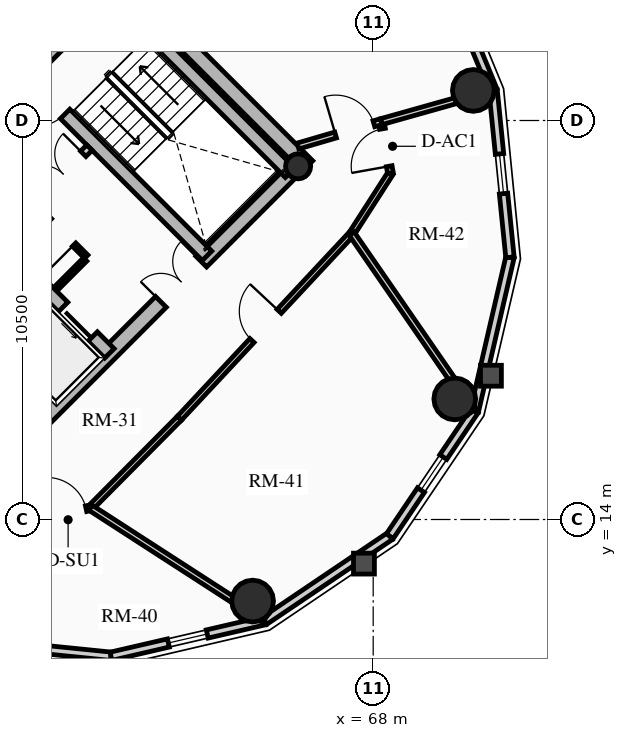
"""IFC4 building model, lengths in metres.
Left out: names, types, materials, properties, quantities, classifications, styles, units other than length and angle.
Written with IfcOpenShell. Run it as: python <this file> out.ifc"""

import sys

from ifc_helpers import new_model, si_unit, direction, frame, frame_2d, origin, origin_2d, place, context, subcontext, project, spatial, rectangle, circle, hollow_circle, extrude, source, transform, mapped, element, fill, save


model = new_model("IFC4")
c1 = context("Model", 3, precision=1e-05, world=origin(), true_north=direction((0.0, 1.0)))
c2 = subcontext(c1, "Body", "Model", "MODEL_VIEW")
j1 = project(units=[si_unit("LENGTHUNIT", "METRE"), si_unit("PLANEANGLEUNIT", "RADIAN")], contexts=[c1])
p1 = place(None, origin())
s1 = spatial("IfcSite", under=j1, at=p1, CompositionType="ELEMENT")
p2 = place(p1, origin())
s2 = spatial("IfcBuilding", under=s1, at=p2, CompositionType="ELEMENT")
p3 = place(p2, frame((0.0, 0.0, 211.21)))
s3 = spatial("IfcBuildingStorey", under=s2, at=p3, CompositionType="ELEMENT", Elevation=211.21)
p4 = place(p3, frame((66.268, 23.298, 0.0), z_axis=(0.0, 0.0, 1.0), x_axis=(-0.707106781187, 0.707106781187, 0.0)))
e1 = element("IfcWall", 1, at=p4, inside=s3, PredefinedType="SHEAR", context=c2, shape_type="SweptSolid", body=[
    extrude(rectangle(XDim=14.1, YDim=0.4, at=frame_2d((7.05, 0.0))), origin(), (0.0, 0.0, 1.0), 2.91),
])
p5 = place(p3, frame((58.561, 15.873, 0.0), z_axis=(0.0, 0.0, 1.0), x_axis=(0.707106781187, 0.707106781187, 0.0)))
e2 = element("IfcWall", 2, at=p5, inside=s3, PredefinedType="SHEAR", context=c2, shape_type="SweptSolid", body=[
    extrude(rectangle(XDim=10.7, YDim=0.4, at=frame_2d((5.35, 0.0))), origin(), (0.0, 0.0, 1.0), 2.91),
])
m1 = source(origin(), c2, "Body", "SweptSolid", [
    extrude(rectangle(XDim=1.5, YDim=2.02, at=frame_2d((0.75, 1.01))), frame((0.0, 0.21, 0.0), z_axis=(0.0, -1.0, 0.0), x_axis=(1.0, 0.0, 0.0)), (0.0, 0.0, 1.0), 0.42),
])
p6 = place(p5, frame((5.45, 0.0, 0.0)))
e3 = element("IfcOpeningElement", 3, at=p6, cuts=e2, PredefinedType="OPENING", context=c2, shape_type="MappedRepresentation", body=[
    mapped(m1, transform((0.0, 0.0, 0.0), x_axis=(1.0, 0.0, 0.0), y_axis=(0.0, 1.0, 0.0), z_axis=(0.0, 0.0, 1.0), scale=1.0)),
])
p7 = place(p3, frame((61.06, 18.373, 0.0), z_axis=(0.0, 0.0, 1.0), x_axis=(-0.707106781187, 0.707106781187, 0.0)))
e4 = element("IfcWall", 4, at=p7, inside=s3, PredefinedType="SHEAR", context=c2, shape_type="SweptSolid", body=[
    extrude(rectangle(XDim=13.7, YDim=0.35, at=frame_2d((6.85, 0.0))), origin(), (0.0, 0.0, 1.0), 2.91),
])
m2 = source(origin(), c2, "Body", "SweptSolid", [
    extrude(rectangle(XDim=1.1, YDim=2.015, at=frame_2d((0.55, 1.007))), frame((0.0, 0.185, 0.0), z_axis=(0.0, -1.0, 0.0), x_axis=(1.0, 0.0, 0.0)), (0.0, 0.0, 1.0), 0.37),
])
p8 = place(p7, frame((4.85, 0.0, 0.0)))
e5 = element("IfcOpeningElement", 5, at=p8, cuts=e4, PredefinedType="OPENING", context=c2, shape_type="MappedRepresentation", body=[
    mapped(m2, transform((0.0, 0.0, 0.0), x_axis=(1.0, 0.0, 0.0), y_axis=(0.0, 1.0, 0.0), z_axis=(0.0, 0.0, 1.0), scale=1.0)),
])
p9 = place(p7, frame((0.625, 0.0, 0.0)))
e6 = element("IfcOpeningElement", 6, at=p9, cuts=e4, PredefinedType="OPENING", context=c2, shape_type="MappedRepresentation", body=[
    mapped(m2, transform((0.0, 0.0, 0.0), x_axis=(1.0, 0.0, 0.0), y_axis=(0.0, 1.0, 0.0), z_axis=(0.0, 0.0, 1.0), scale=1.0)),
])
p10 = place(p7, frame((2.625, 0.0, 0.0)))
e7 = element("IfcOpeningElement", 7, at=p10, cuts=e4, PredefinedType="OPENING", context=c2, shape_type="MappedRepresentation", body=[
    mapped(m2, transform((0.0, 0.0, 0.0), x_axis=(1.0, 0.0, 0.0), y_axis=(0.0, 1.0, 0.0), z_axis=(0.0, 0.0, 1.0), scale=1.0)),
])
m3 = source(origin(), c2, "Body", "SweptSolid", [
    extrude(rectangle(XDim=1.15, YDim=2.02, at=frame_2d((0.575, 1.01))), frame((0.0, 0.185, 0.0), z_axis=(0.0, -1.0, 0.0), x_axis=(1.0, 0.0, 0.0)), (0.0, 0.0, 1.0), 0.37),
])
p11 = place(p7, frame((7.27, 0.0, 0.0)))
e8 = element("IfcOpeningElement", 8, at=p11, cuts=e4, PredefinedType="OPENING", context=c2, shape_type="MappedRepresentation", body=[
    mapped(m3, transform((0.0, 0.0, 0.0), x_axis=(1.0, 0.0, 0.0), y_axis=(0.0, 1.0, 0.0), z_axis=(0.0, 0.0, 1.0), scale=1.0)),
])
p12 = place(p3, frame((63.627, 20.94, 0.0), z_axis=(0.0, 0.0, 1.0), x_axis=(-0.707119496762, 0.707094065383, 0.0)))
e9 = element("IfcWall", 9, at=p12, inside=s3, PredefinedType="SHEAR", context=c2, shape_type="SweptSolid", body=[
    extrude(rectangle(XDim=9.6, YDim=0.35, at=frame_2d((4.8, 0.0))), origin(), (0.0, 0.0, 1.0), 2.91),
])
p13 = place(p12, frame((5.28, 0.0, 0.0)))
e10 = element("IfcOpeningElement", 10, at=p13, cuts=e9, PredefinedType="OPENING", context=c2, shape_type="MappedRepresentation", body=[
    mapped(m3, transform((0.0, 0.0, 0.0), x_axis=(1.0, 0.0, 0.0), y_axis=(0.0, 1.0, 0.0), z_axis=(0.0, 0.0, 1.0), scale=1.0)),
])
p14 = place(p3, frame((65.812, 23.125, 0.0), z_axis=(0.0, 0.0, 1.0), x_axis=(-0.707106781187, 0.707106781187, 0.0)))
e11 = element("IfcWall", 11, at=p14, inside=s3, PredefinedType="SHEAR", context=c2, shape_type="SweptSolid", body=[
    extrude(rectangle(XDim=6.695, YDim=0.35, at=frame_2d((3.348, 0.0))), origin(), (0.0, 0.0, 1.0), 2.91),
])
p15 = place(p3, frame((58.893, 25.674, 0.0), z_axis=(0.0, 0.0, 1.0), x_axis=(0.707106781187, 0.707106781187, 0.0)))
e12 = element("IfcWall", 12, at=p15, inside=s3, PredefinedType="SHEAR", context=c2, shape_type="SweptSolid", body=[
    extrude(rectangle(XDim=3.285, YDim=0.35, at=frame_2d((1.643, 0.0))), origin(), (0.0, 0.0, 1.0), 2.91),
])
p16 = place(p3, frame((66.024, 23.294, 0.0), z_axis=(0.0, 0.0, 1.0), x_axis=(0.707106781187, 0.707106781187, 0.0)))
e13 = element("IfcColumn", 13, at=p16, inside=s3, PredefinedType="COLUMN", context=c2, shape_type="SweptSolid", body=[
    extrude(hollow_circle(Radius=0.33, WallThickness=0.025, at=origin_2d()), origin(), (0.0, 0.0, 1.0), 2.91),
])
for number, where, z_axis, x_axis in (
    (14, (64.827, 11.854, 0.0), (0.0, 0.0, 1.0), (1.0, 0.0, 0.0)),
    (15, (70.146, 17.173, 0.0), (0.0, 0.0, 1.0), (1.0, 0.0, 0.0)),
    (16, (70.635, 25.291, 0.0), (0.0, 0.0, 1.0), (1.0, 0.0, 0.0)),
):
    element("IfcColumn", number, at=place(p3, frame(where, z_axis=z_axis, x_axis=x_axis)), inside=s3, PredefinedType="USERDEFINED", context=c2, shape_type="SweptSolid", body=[
        extrude(circle(Radius=0.55, at=origin_2d()), origin(), (0.0, 0.0, 1.0), 2.91),
    ])
p17 = place(p3, frame((61.1, 10.401, 0.0), z_axis=(0.0, 0.0, 1.0), x_axis=(-0.994929930991, 0.100570534541, 0.0)))
e17 = element("IfcWall", 17, at=p17, inside=s3, PredefinedType="SOLIDWALL", context=c2, shape_type="SweptSolid", body=[
    extrude(rectangle(XDim=4.418, YDim=0.22, at=frame_2d((2.209, 0.0))), origin(), (0.0, 0.0, 1.0), 2.322),
])
m4 = source(origin(), c2, "Body", "SweptSolid", [
    extrude(rectangle(XDim=1.05, YDim=1.3, at=frame_2d((0.525, 0.65))), frame((0.0, 0.12, 0.0), z_axis=(0.0, -1.0, 0.0), x_axis=(1.0, 0.0, 0.0)), (0.0, 0.0, 1.0), 0.24),
])
p18 = place(p17, frame((1.684, 0.0, 0.65)))
e18 = element("IfcOpeningElement", 18, at=p18, cuts=e17, PredefinedType="OPENING", context=c2, shape_type="MappedRepresentation", body=[
    mapped(m4, transform((0.0, 0.0, 0.0), x_axis=(1.0, 0.0, 0.0), y_axis=(0.0, 1.0, 0.0), z_axis=(0.0, 0.0, 1.0), scale=1.0)),
])
p19 = place(p3, frame((65.144, 11.337, 0.0), z_axis=(0.0, 0.0, 1.0), x_axis=(-0.974249228678, -0.225473813158, 0.0)))
e19 = element("IfcWall", 19, at=p19, inside=s3, PredefinedType="SOLIDWALL", context=c2, shape_type="SweptSolid", body=[
    extrude(rectangle(XDim=4.15, YDim=0.22, at=frame_2d((2.075, 0.0))), origin(), (0.0, 0.0, 1.0), 2.322),
])
p20 = place(p19, frame((1.55, 0.0, 0.65)))
e20 = element("IfcOpeningElement", 20, at=p20, cuts=e19, PredefinedType="OPENING", context=c2, shape_type="MappedRepresentation", body=[
    mapped(m4, transform((0.0, 0.0, 0.0), x_axis=(1.0, 0.0, 0.0), y_axis=(0.0, 1.0, 0.0), z_axis=(0.0, 0.0, 1.0), scale=1.0)),
])
p21 = place(p3, frame((68.439, 13.561, 0.0), z_axis=(0.0, 0.0, 1.0), x_axis=(-0.828833723692, -0.559495003079, 0.0)))
e21 = element("IfcWall", 21, at=p21, inside=s3, PredefinedType="SOLIDWALL", context=c2, shape_type="SweptSolid", body=[
    extrude(rectangle(XDim=3.976, YDim=0.22, at=frame_2d((1.988, 0.0))), origin(), (0.0, 0.0, 1.0), 2.322),
])
p22 = place(p3, frame((70.663, 16.856, 0.0), z_axis=(0.0, 0.0, 1.0), x_axis=(-0.559495003079, -0.828833723692, 0.0)))
e22 = element("IfcWall", 22, at=p22, inside=s3, PredefinedType="SOLIDWALL", context=c2, shape_type="SweptSolid", body=[
    extrude(rectangle(XDim=3.976, YDim=0.22, at=frame_2d((1.988, 0.0))), origin(), (0.0, 0.0, 1.0), 2.322),
])
p23 = place(p22, frame((1.463, 0.0, 0.65)))
e23 = element("IfcOpeningElement", 23, at=p23, cuts=e22, PredefinedType="OPENING", context=c2, shape_type="MappedRepresentation", body=[
    mapped(m4, transform((0.0, 0.0, 0.0), x_axis=(1.0, 0.0, 0.0), y_axis=(0.0, 1.0, 0.0), z_axis=(0.0, 0.0, 1.0), scale=1.0)),
])
p24 = place(p3, frame((71.599, 20.9, 0.0), z_axis=(0.0, 0.0, 1.0), x_axis=(-0.225473813158, -0.974249228678, 0.0)))
e24 = element("IfcWall", 24, at=p24, inside=s3, PredefinedType="SOLIDWALL", context=c2, shape_type="SweptSolid", body=[
    extrude(rectangle(XDim=4.15, YDim=0.22, at=frame_2d((2.075, 0.0))), origin(), (0.0, 0.0, 1.0), 2.322),
])
p25 = place(p3, frame((71.155, 25.295, 0.0), z_axis=(0.0, 0.0, 1.0), x_axis=(0.100570534541, -0.994929930991, 0.0)))
e25 = element("IfcWall", 25, at=p25, inside=s3, PredefinedType="SOLIDWALL", context=c2, shape_type="SweptSolid", body=[
    extrude(rectangle(XDim=4.418, YDim=0.22, at=frame_2d((2.209, 0.0))), origin(), (0.0, 0.0, 1.0), 2.322),
])
p26 = place(p25, frame((1.684, 0.0, 0.65)))
e26 = element("IfcOpeningElement", 26, at=p26, cuts=e25, PredefinedType="OPENING", context=c2, shape_type="MappedRepresentation", body=[
    mapped(m4, transform((0.0, 0.0, 0.0), x_axis=(1.0, 0.0, 0.0), y_axis=(0.0, 1.0, 0.0), z_axis=(0.0, 0.0, 1.0), scale=1.0)),
])
p27 = place(p3, frame((69.374, 29.613, 0.0), z_axis=(0.0, 0.0, 1.0), x_axis=(0.381309704956, -0.924447353237, 0.0)))
e27 = element("IfcWall", 27, at=p27, inside=s3, PredefinedType="SOLIDWALL", context=c2, shape_type="SweptSolid", body=[
    extrude(rectangle(XDim=4.671, YDim=0.22, at=frame_2d((2.335, 0.0))), origin(), (0.0, 0.0, 1.0), 2.322),
])
p28 = place(p3, frame((58.214, 21.467, 0.0), z_axis=(0.0, 0.0, 1.0), x_axis=(0.707106781187, 0.707106781187, 0.0)))
e28 = element("IfcWall", 28, at=p28, inside=s3, PredefinedType="PARTITIONING", context=c2, shape_type="SweptSolid", body=[
    extrude(rectangle(XDim=3.28, YDim=0.2, at=frame_2d((1.64, 0.0))), origin(), (0.0, 0.0, 1.0), 2.685),
])
m5 = source(origin(), c2, "Body", "SweptSolid", [
    extrude(rectangle(XDim=1.5, YDim=2.02, at=frame_2d((0.75, 1.01))), frame((0.0, 0.11, 0.0), z_axis=(0.0, -1.0, 0.0), x_axis=(1.0, 0.0, 0.0)), (0.0, 0.0, 1.0), 0.22),
])
p29 = place(p28, frame((1.55, 0.0, 0.0)))
e29 = element("IfcOpeningElement", 29, at=p29, cuts=e28, PredefinedType="OPENING", context=c2, shape_type="MappedRepresentation", body=[
    mapped(m5, transform((0.0, 0.0, 0.0), x_axis=(1.0, 0.0, 0.0), y_axis=(0.0, 1.0, 0.0), z_axis=(0.0, 0.0, 1.0), scale=1.0)),
])
p30 = place(p3, frame((60.448, 20.915, 0.0), z_axis=(0.0, 0.0, 1.0), x_axis=(-0.707106781187, 0.707106781187, 0.0)))
e30 = element("IfcWall", 30, at=p30, inside=s3, PredefinedType="PARTITIONING", context=c2, shape_type="SweptSolid", body=[
    extrude(rectangle(XDim=1.87, YDim=0.125, at=frame_2d((0.935, 0.0))), origin(), (0.0, 0.0, 1.0), 2.685),
])
m6 = source(origin(), c2, "Body", "SweptSolid", [
    extrude(rectangle(XDim=0.9, YDim=2.005, at=frame_2d((0.45, 1.002))), frame((0.0, 0.073, 0.0), z_axis=(0.0, -1.0, 0.0), x_axis=(1.0, 0.0, 0.0)), (0.0, 0.0, 1.0), 0.145),
])
p31 = place(p30, frame((0.45, 0.0, 0.0)))
e31 = element("IfcOpeningElement", 31, at=p31, cuts=e30, PredefinedType="OPENING", context=c2, shape_type="MappedRepresentation", body=[
    mapped(m6, transform((0.0, 0.0, 0.0), x_axis=(1.0, 0.0, 0.0), y_axis=(0.0, 1.0, 0.0), z_axis=(0.0, 0.0, 1.0), scale=1.0)),
])
p32 = place(p3, frame((59.643, 20.066, 0.0), z_axis=(0.0, 0.0, 1.0), x_axis=(0.707106781187, 0.707106781187, 0.0)))
e32 = element("IfcWall", 32, at=p32, inside=s3, PredefinedType="PARTITIONING", context=c2, shape_type="SweptSolid", body=[
    extrude(rectangle(XDim=1.1, YDim=0.125, at=frame_2d((0.55, 0.0))), origin(), (0.0, 0.0, 1.0), 2.685),
])
p33 = place(p3, frame((59.008, 13.963, 0.0), z_axis=(0.0, 0.0, 1.0), x_axis=(0.976020856791, 0.21767702476, 0.0)))
e33 = element("IfcWall", 33, at=p33, inside=s3, PredefinedType="PARTITIONING", context=c2, shape_type="SweptSolid", body=[
    extrude(rectangle(XDim=1.593, YDim=0.15, at=frame_2d((0.796, 0.0))), origin(), (0.0, 0.0, 1.0), 2.255),
])
m7 = source(origin(), c2, "Body", "SweptSolid", [
    extrude(rectangle(XDim=1.05, YDim=2.015, at=frame_2d((0.525, 1.007))), frame((0.0, 0.085, 0.0), z_axis=(0.0, -1.0, 0.0), x_axis=(1.0, 0.0, 0.0)), (0.0, 0.0, 1.0), 0.17),
])
p34 = place(p33, frame((0.423, 0.0, 0.0)))
e34 = element("IfcOpeningElement", 34, at=p34, cuts=e33, PredefinedType="OPENING", context=c2, shape_type="MappedRepresentation", body=[
    mapped(m7, transform((0.0, 0.0, 0.0), x_axis=(1.0, 0.0, 0.0), y_axis=(0.0, 1.0, 0.0), z_axis=(0.0, 0.0, 1.0), scale=1.0)),
])
p35 = place(p3, frame((60.562, 14.31, 0.0), z_axis=(0.0, 0.0, 1.0), x_axis=(0.704566236161, 0.709638230975, 0.0)))
e35 = element("IfcWall", 35, at=p35, inside=s3, PredefinedType="PARTITIONING", context=c2, shape_type="SweptSolid", body=[
    extrude(rectangle(XDim=3.321, YDim=0.15, at=frame_2d((1.661, 0.0))), origin(), (0.0, 0.0, 1.0), 2.322),
])
p36 = place(p3, frame((62.903, 16.667, 0.0), z_axis=(0.0, 0.0, 1.0), x_axis=(0.682371947497, 0.731005147225, 0.0)))
e36 = element("IfcWall", 36, at=p36, inside=s3, PredefinedType="PARTITIONING", context=c2, shape_type="SweptSolid", body=[
    extrude(rectangle(XDim=6.642, YDim=0.15, at=frame_2d((3.321, 0.0))), origin(), (0.0, 0.0, 1.0), 2.255),
])
p37 = place(p36, frame((2.796, 0.0, 0.0)))
e37 = element("IfcOpeningElement", 37, at=p37, cuts=e36, PredefinedType="OPENING", context=c2, shape_type="MappedRepresentation", body=[
    mapped(m7, transform((0.0, 0.0, 0.0), x_axis=(1.0, 0.0, 0.0), y_axis=(0.0, 1.0, 0.0), z_axis=(0.0, 0.0, 1.0), scale=1.0)),
])
p38 = place(p3, frame((67.435, 21.521, 0.0), z_axis=(0.0, 0.0, 1.0), x_axis=(0.540777197838, 0.841165870859, 0.0)))
e38 = element("IfcWall", 38, at=p38, inside=s3, PredefinedType="PARTITIONING", context=c2, shape_type="SweptSolid", body=[
    extrude(rectangle(XDim=1.888, YDim=0.15, at=frame_2d((0.944, 0.0))), origin(), (0.0, 0.0, 1.0), 2.255),
])
p39 = place(p3, frame((68.456, 23.11, 0.0), z_axis=(0.0, 0.0, 1.0), x_axis=(-0.1772522795, 0.984165448191, 0.0)))
e39 = element("IfcWall", 39, at=p39, inside=s3, PredefinedType="PARTITIONING", context=c2, shape_type="SweptSolid", body=[
    extrude(rectangle(XDim=1.382, YDim=0.15, at=frame_2d((0.691, 0.0))), origin(), (0.0, 0.0, 1.0), 2.322),
])
m8 = source(origin(), c2, "Body", "SweptSolid", [
    extrude(rectangle(XDim=1.0, YDim=2.015, at=frame_2d((0.5, 1.007))), frame((0.0, 0.085, 0.0), z_axis=(0.0, -1.0, 0.0), x_axis=(1.0, 0.0, 0.0)), (0.0, 0.0, 1.0), 0.17),
])
p40 = place(p39, frame((0.191, 0.0, 0.0)))
e40 = element("IfcOpeningElement", 40, at=p40, cuts=e39, PredefinedType="OPENING", context=c2, shape_type="MappedRepresentation", body=[
    mapped(m8, transform((0.0, 0.0, 0.0), x_axis=(1.0, 0.0, 0.0), y_axis=(0.0, 1.0, 0.0), z_axis=(0.0, 0.0, 1.0), scale=1.0)),
])
p41 = place(p3, frame((60.562, 14.31, 0.0), z_axis=(0.0, 0.0, 1.0), x_axis=(0.839858797161, -0.542804938105, 0.0)))
e41 = element("IfcWall", 41, at=p41, inside=s3, PredefinedType="PARTITIONING", context=c2, shape_type="SweptSolid", body=[
    extrude(rectangle(XDim=5.444, YDim=0.16, at=frame_2d((2.722, 0.0))), origin(), (0.0, 0.0, 1.0), 2.322),
])
p42 = place(p3, frame((67.435, 21.521, 0.0), z_axis=(0.0, 0.0, 1.0), x_axis=(0.567700677576, -0.823235045828, 0.0)))
e42 = element("IfcWall", 42, at=p42, inside=s3, PredefinedType="PARTITIONING", context=c2, shape_type="SweptSolid", body=[
    extrude(rectangle(XDim=5.656, YDim=0.16, at=frame_2d((2.828, 0.0))), origin(), (0.0, 0.0, 1.0), 2.322),
])
p43 = place(p3, frame((68.211, 24.469, 0.0), z_axis=(0.0, 0.0, 1.0), x_axis=(0.962605107736, 0.270908483735, 0.0)))
e43 = element("IfcWall", 43, at=p43, inside=s3, PredefinedType="PARTITIONING", context=c2, shape_type="SweptSolid", body=[
    extrude(rectangle(XDim=3.038, YDim=0.16, at=frame_2d((1.519, 0.0))), origin(), (0.0, 0.0, 1.0), 2.322),
])
p44 = place(p3, frame((66.021, 23.828, 0.0), z_axis=(0.0, 0.0, 1.0), x_axis=(0.959727558294, 0.280932400856, 0.0)))
e44 = element("IfcWall", 44, at=p44, inside=s3, PredefinedType="PARTITIONING", context=c2, shape_type="SweptSolid", body=[
    extrude(rectangle(XDim=2.282, YDim=0.16, at=frame_2d((1.141, 0.0))), origin(), (0.0, 0.0, 1.0), 2.255),
])
m9 = source(origin(), c2, "Body", "SweptSolid", [
    extrude(rectangle(XDim=1.05, YDim=2.015, at=frame_2d((0.525, 1.007))), frame((0.0, 0.09, 0.0), z_axis=(0.0, -1.0, 0.0), x_axis=(1.0, 0.0, 0.0)), (0.0, 0.0, 1.0), 0.18),
])
p45 = place(p44, frame((1.032, 0.0, 0.0)))
e45 = element("IfcOpeningElement", 45, at=p45, cuts=e44, PredefinedType="OPENING", context=c2, shape_type="MappedRepresentation", body=[
    mapped(m9, transform((0.0, 0.0, 0.0), x_axis=(1.0, 0.0, 0.0), y_axis=(0.0, 1.0, 0.0), z_axis=(0.0, 0.0, 1.0), scale=1.0)),
])
m10 = source(origin(), c2, "Body", "SweptSolid", [
    extrude(rectangle(XDim=1.05, YDim=1.3, at=frame_2d((0.525, 0.65))), frame((0.0, 0.03, 0.0), z_axis=(0.0, -1.0, 0.0), x_axis=(1.0, 0.0, 0.0)), (0.0, 0.0, 1.0), 0.06),
])
p46 = place(p20, origin())
e46 = element("IfcWindow", 46, at=p46, inside=s3, PartitioningType="SINGLE_PANEL", PredefinedType="WINDOW", context=c2, shape_type="MappedRepresentation", body=[
    mapped(m10, transform((0.0, 0.0, 0.0), x_axis=(1.0, 0.0, 0.0), y_axis=(0.0, 1.0, 0.0), z_axis=(0.0, 0.0, 1.0), scale=1.0)),
])
fill(e20, e46)
p47 = place(p23, origin())
e47 = element("IfcWindow", 47, at=p47, inside=s3, PartitioningType="SINGLE_PANEL", PredefinedType="WINDOW", context=c2, shape_type="MappedRepresentation", body=[
    mapped(m10, transform((0.0, 0.0, 0.0), x_axis=(1.0, 0.0, 0.0), y_axis=(0.0, 1.0, 0.0), z_axis=(0.0, 0.0, 1.0), scale=1.0)),
])
fill(e23, e47)
p48 = place(p26, origin())
e48 = element("IfcWindow", 48, at=p48, inside=s3, PartitioningType="SINGLE_PANEL", PredefinedType="WINDOW", context=c2, shape_type="MappedRepresentation", body=[
    mapped(m10, transform((0.0, 0.0, 0.0), x_axis=(1.0, 0.0, 0.0), y_axis=(0.0, 1.0, 0.0), z_axis=(0.0, 0.0, 1.0), scale=1.0)),
])
fill(e26, e48)
m11 = source(origin(), c2, "Body", "SweptSolid", [
    extrude(rectangle(XDim=1.1, YDim=2.015, at=frame_2d((0.55, 1.007))), frame((0.0, 0.025, 0.0), z_axis=(0.0, -1.0, 0.0), x_axis=(1.0, 0.0, 0.0)), (0.0, 0.0, 1.0), 0.05),
])
p49 = place(p9, origin())
e49 = element("IfcDoor", 49, at=p49, inside=s3, OperationType="SLIDING_TO_LEFT", PredefinedType="DOOR", context=c2, shape_type="MappedRepresentation", body=[
    mapped(m11, transform((0.0, 0.0, 0.0), x_axis=(1.0, 0.0, 0.0), y_axis=(0.0, 1.0, 0.0), z_axis=(0.0, 0.0, 1.0), scale=1.0)),
])
fill(e6, e49)
m12 = source(origin(), c2, "Body", "SweptSolid", [
    extrude(rectangle(XDim=1.15, YDim=2.02, at=frame_2d((0.575, 1.01))), frame((0.0, 0.025, 0.0), z_axis=(0.0, -1.0, 0.0), x_axis=(1.0, 0.0, 0.0)), (0.0, 0.0, 1.0), 0.05),
])
p50 = place(p13, origin())
e50 = element("IfcDoor", 50, at=p50, inside=s3, OperationType="SINGLE_SWING_RIGHT", PredefinedType="DOOR", context=c2, shape_type="MappedRepresentation", body=[
    mapped(m12, transform((0.0, 0.0, 0.0), x_axis=(1.0, 0.0, 0.0), y_axis=(0.0, 1.0, 0.0), z_axis=(0.0, 0.0, 1.0), scale=1.0)),
])
fill(e10, e50)
m13 = source(origin(), c2, "Body", "SweptSolid", [
    extrude(rectangle(XDim=1.5, YDim=2.02, at=frame_2d((0.75, 1.01))), frame((0.0, 0.025, 0.0), z_axis=(0.0, -1.0, 0.0), x_axis=(1.0, 0.0, 0.0)), (0.0, 0.0, 1.0), 0.05),
])
p51 = place(p6, origin())
e51 = element("IfcDoor", 51, at=p51, inside=s3, OperationType="DOUBLE_DOOR_SINGLE_SWING", PredefinedType="DOOR", context=c2, shape_type="MappedRepresentation", body=[
    mapped(m13, transform((0.0, 0.0, 0.0), x_axis=(1.0, 0.0, 0.0), y_axis=(0.0, 1.0, 0.0), z_axis=(0.0, 0.0, 1.0), scale=1.0)),
])
fill(e3, e51)
p52 = place(p29, origin())
e52 = element("IfcDoor", 52, at=p52, inside=s3, OperationType="DOUBLE_DOOR_SINGLE_SWING", PredefinedType="DOOR", context=c2, shape_type="MappedRepresentation", body=[
    mapped(m13, transform((0.0, 0.0, 0.0), x_axis=(1.0, 0.0, 0.0), y_axis=(0.0, 1.0, 0.0), z_axis=(0.0, 0.0, 1.0), scale=1.0)),
])
fill(e29, e52)
m14 = source(origin(), c2, "Body", "SweptSolid", [
    extrude(rectangle(XDim=0.9, YDim=2.005, at=frame_2d((0.45, 1.002))), frame((0.0, 0.025, 0.0), z_axis=(0.0, -1.0, 0.0), x_axis=(1.0, 0.0, 0.0)), (0.0, 0.0, 1.0), 0.05),
])
p53 = place(p31, origin())
e53 = element("IfcDoor", 53, at=p53, inside=s3, OperationType="SINGLE_SWING_LEFT", PredefinedType="DOOR", context=c2, shape_type="MappedRepresentation", body=[
    mapped(m14, transform((0.0, 0.0, 0.0), x_axis=(1.0, 0.0, 0.0), y_axis=(0.0, 1.0, 0.0), z_axis=(0.0, 0.0, 1.0), scale=1.0)),
])
fill(e31, e53)
m15 = source(origin(), c2, "Body", "SweptSolid", [
    extrude(rectangle(XDim=1.05, YDim=2.015, at=frame_2d((0.525, 1.007))), frame((0.0, 0.025, 0.0), z_axis=(0.0, -1.0, 0.0), x_axis=(1.0, 0.0, 0.0)), (0.0, 0.0, 1.0), 0.05),
])
p54 = place(p45, origin())
e54 = element("IfcDoor", 54, at=p54, inside=s3, OperationType="SINGLE_SWING_LEFT", PredefinedType="DOOR", context=c2, shape_type="MappedRepresentation", body=[
    mapped(m15, transform((0.0, 0.0, 0.0), x_axis=(1.0, 0.0, 0.0), y_axis=(0.0, 1.0, 0.0), z_axis=(0.0, 0.0, 1.0), scale=1.0)),
])
fill(e45, e54)
p55 = place(p34, origin())
e55 = element("IfcDoor", 55, at=p55, inside=s3, OperationType="SINGLE_SWING_LEFT", PredefinedType="DOOR", context=c2, shape_type="MappedRepresentation", body=[
    mapped(m15, transform((0.0, 0.0, 0.0), x_axis=(1.0, 0.0, 0.0), y_axis=(0.0, 1.0, 0.0), z_axis=(0.0, 0.0, 1.0), scale=1.0)),
])
fill(e34, e55)
p56 = place(p37, origin())
e56 = element("IfcDoor", 56, at=p56, inside=s3, OperationType="SINGLE_SWING_RIGHT", PredefinedType="DOOR", context=c2, shape_type="MappedRepresentation", body=[
    mapped(m15, transform((0.0, 0.0, 0.0), x_axis=(1.0, 0.0, 0.0), y_axis=(0.0, 1.0, 0.0), z_axis=(0.0, 0.0, 1.0), scale=1.0)),
])
fill(e37, e56)
m16 = source(origin(), c2, "Body", "SweptSolid", [
    extrude(rectangle(XDim=1.0, YDim=2.015, at=frame_2d((0.5, 1.007))), frame((0.0, 0.025, 0.0), z_axis=(0.0, -1.0, 0.0), x_axis=(1.0, 0.0, 0.0)), (0.0, 0.0, 1.0), 0.05),
])
p57 = place(p40, origin())
e57 = element("IfcDoor", 57, at=p57, inside=s3, OperationType="SINGLE_SWING_LEFT", PredefinedType="DOOR", context=c2, shape_type="MappedRepresentation", body=[
    mapped(m16, transform((0.0, 0.0, 0.0), x_axis=(1.0, 0.0, 0.0), y_axis=(0.0, 1.0, 0.0), z_axis=(0.0, 0.0, 1.0), scale=1.0)),
])
fill(e40, e57)
save(model, sys.argv[1])
